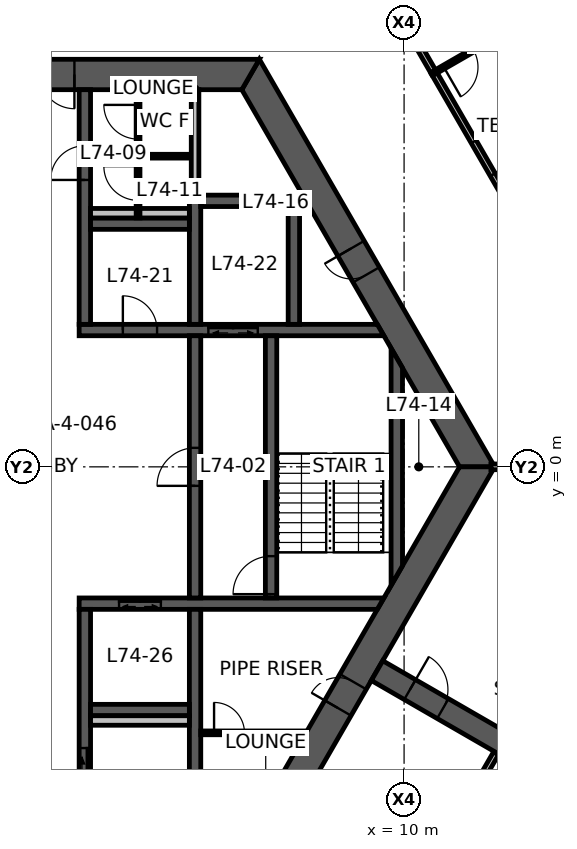
"""IFC4 building model, lengths in metres.
Left out: names, types, materials, properties, quantities, classifications, styles, units other than length and angle.
Written with IfcOpenShell. Run it as: python <this file> out.ifc"""

import sys

from ifc_helpers import new_model, si_unit, direction, frame, frame_2d, origin, place, context, subcontext, project, spatial, polyline, rectangle, outline, extrude, element, fill, save


model = new_model("IFC4")
c1 = context("Model", 3, precision=1e-05, world=origin(), true_north=direction((0.0, 1.0)))
c2 = subcontext(c1, "Body", "Model", "MODEL_VIEW")
j1 = project(units=[si_unit("LENGTHUNIT", "METRE"), si_unit("PLANEANGLEUNIT", "RADIAN")], contexts=[c1])
p1 = place(None, origin())
s1 = spatial("IfcSite", under=j1, at=p1, CompositionType="ELEMENT")
p2 = place(p1, origin())
s2 = spatial("IfcBuilding", under=s1, at=p2, CompositionType="ELEMENT")
p3 = place(p2, frame((0.0, 0.0, 294.7)))
s3 = spatial("IfcBuildingStorey", under=s2, at=p3, CompositionType="ELEMENT", Elevation=294.7)
p4 = place(p3, frame((11.922, 0.0, 0.0), z_axis=(0.0, 0.0, 1.0), x_axis=(-0.500004296715, 0.866022923061, 0.0)))
e1 = element("IfcWall", 1, at=p4, inside=s3, PredefinedType="SHEAR", context=c2, shape_type="SweptSolid", body=[
    extrude(outline(polyline([(-0.231, -0.4), (5.835, -0.4), (6.635, -0.4), (12.153, -0.4), (11.691, 0.4), (6.635, 0.4), (5.835, 0.4), (0.231, 0.4), (-0.231, -0.4)])), origin(), (0.0, 0.0, 1.0), 3.9),
])
p5 = place(p4, frame((5.835, 0.0, 0.0)))
e2 = element("IfcOpeningElement", 2, at=p5, cuts=e1, PredefinedType="OPENING", context=c2, shape_type="SweptSolid", body=[
    extrude(rectangle(XDim=0.8, YDim=2.1, at=frame_2d((0.4, 1.05))), frame((0.0, 0.41, 0.0), z_axis=(0.0, -1.0, 0.0), x_axis=(1.0, 0.0, 0.0)), (0.0, 0.0, 1.0), 0.82),
])
p6 = place(p3, frame((5.961, 10.325, 0.0), z_axis=(0.0, 0.0, 1.0), x_axis=(-1.0, 0.0, 0.0)))
e3 = element("IfcWall", 3, at=p6, inside=s3, PredefinedType="SHEAR", context=c2, shape_type="SweptSolid", body=[
    extrude(outline(polyline([(-0.231, -0.4), (4.636, -0.4), (5.536, -0.4), (6.386, -0.4), (7.286, -0.4), (12.153, -0.4), (11.691, 0.4), (7.286, 0.4), (6.386, 0.4), (5.536, 0.4), (4.636, 0.4), (0.231, 0.4), (-0.231, -0.4)])), origin(), (0.0, 0.0, 1.0), 3.9),
])
p7 = place(p6, frame((6.386, 0.0, 0.0)))
e4 = element("IfcOpeningElement", 4, at=p7, cuts=e3, PredefinedType="OPENING", context=c2, shape_type="SweptSolid", body=[
    extrude(rectangle(XDim=0.9, YDim=2.1, at=frame_2d((0.45, 1.05))), frame((0.0, 0.41, 0.0), z_axis=(0.0, -1.0, 0.0), x_axis=(1.0, 0.0, 0.0)), (0.0, 0.0, 1.0), 0.82),
])
p8 = place(p6, frame((4.636, 0.0, 0.0)))
e5 = element("IfcOpeningElement", 5, at=p8, cuts=e3, PredefinedType="OPENING", context=c2, shape_type="SweptSolid", body=[
    extrude(rectangle(XDim=0.9, YDim=2.1, at=frame_2d((0.45, 1.05))), frame((0.0, 0.41, 0.0), z_axis=(0.0, -1.0, 0.0), x_axis=(1.0, 0.0, 0.0)), (0.0, 0.0, 1.0), 0.82),
])
p9 = place(p3, frame((5.961, -10.325, 0.0), z_axis=(0.0, 0.0, 1.0), x_axis=(0.500004296715, 0.866022923061, 0.0)))
e6 = element("IfcWall", 6, at=p9, inside=s3, PredefinedType="SHEAR", context=c2, shape_type="SweptSolid", body=[
    extrude(outline(polyline([(-0.231, -0.4), (4.594, -0.4), (5.394, -0.4), (12.153, -0.4), (11.691, 0.4), (5.394, 0.4), (4.594, 0.4), (0.231, 0.4), (-0.231, -0.4)])), origin(), (0.0, 0.0, 1.0), 3.9),
])
p10 = place(p9, frame((4.594, 0.0, 0.0)))
e7 = element("IfcOpeningElement", 7, at=p10, cuts=e6, PredefinedType="OPENING", context=c2, shape_type="SweptSolid", body=[
    extrude(rectangle(XDim=0.8, YDim=2.1, at=frame_2d((0.4, 1.05))), frame((0.0, 0.41, 0.0), z_axis=(0.0, -1.0, 0.0), x_axis=(1.0, 0.0, 0.0)), (0.0, 0.0, 1.0), 0.82),
])
p11 = place(p3, frame((9.288, -5.363, 0.0), z_axis=(0.0, 0.0, 1.0), x_axis=(0.866031736626, -0.499989031036, 0.0)))
e8 = element("IfcWall", 8, at=p11, inside=s3, PredefinedType="SHEAR", context=c2, shape_type="SweptSolid", body=[
    extrude(rectangle(XDim=7.796, YDim=0.6, at=frame_2d((3.898, 0.0))), origin(), (0.0, 0.0, 1.0), 3.9),
])
p12 = place(p11, frame((1.0, 0.0, 0.0)))
e9 = element("IfcOpeningElement", 9, at=p12, cuts=e8, PredefinedType="OPENING", context=c2, shape_type="SweptSolid", body=[
    extrude(rectangle(XDim=1.0, YDim=2.1, at=frame_2d((0.5, 1.05))), frame((0.0, 0.31, 0.0), z_axis=(0.0, -1.0, 0.0), x_axis=(1.0, 0.0, 0.0)), (0.0, 0.0, 1.0), 0.62),
])
p13 = place(p3, frame((1.45, 3.6, 0.0), z_axis=(0.0, 0.0, 1.0), x_axis=(1.0, 0.0, 0.0)))
e10 = element("IfcWall", 10, at=p13, inside=s3, PredefinedType="SHEAR", context=c2, shape_type="SweptSolid", body=[
    extrude(outline(polyline([(0.0, -0.15), (1.15, -0.15), (2.05, -0.15), (3.4, -0.15), (4.7, -0.15), (8.019, -0.15), (7.845, 0.15), (4.7, 0.15), (3.4, 0.15), (2.05, 0.15), (1.15, 0.15), (0.0, 0.15), (0.0, -0.15)])), origin(), (0.0, 0.0, 1.0), 3.9),
])
p14 = place(p13, frame((1.15, 0.0, 0.0)))
e11 = element("IfcOpeningElement", 11, at=p14, cuts=e10, PredefinedType="OPENING", context=c2, shape_type="SweptSolid", body=[
    extrude(rectangle(XDim=0.9, YDim=2.1, at=frame_2d((0.45, 1.05))), frame((0.0, 0.16, 0.0), z_axis=(0.0, -1.0, 0.0), x_axis=(1.0, 0.0, 0.0)), (0.0, 0.0, 1.0), 0.32),
])
p15 = place(p13, frame((3.4, 0.0, 0.0)))
e12 = element("IfcOpeningElement", 12, at=p15, cuts=e10, PredefinedType="OPENING", context=c2, shape_type="SweptSolid", body=[
    extrude(rectangle(XDim=1.3, YDim=2.1, at=frame_2d((0.65, 1.05))), frame((0.0, 0.16, 0.0), z_axis=(0.0, -1.0, 0.0), x_axis=(1.0, 0.0, 0.0)), (0.0, 0.0, 1.0), 0.32),
])
p16 = place(p3, frame((1.45, -3.6, 0.0), z_axis=(0.0, 0.0, 1.0), x_axis=(1.0, 0.0, 0.0)))
e13 = element("IfcWall", 13, at=p16, inside=s3, PredefinedType="SHEAR", context=c2, shape_type="SweptSolid", body=[
    extrude(outline(polyline([(0.0, -0.15), (1.05, -0.15), (2.15, -0.15), (7.845, -0.15), (8.019, 0.15), (2.15, 0.15), (1.05, 0.15), (0.0, 0.15), (0.0, -0.15)])), origin(), (0.0, 0.0, 1.0), 3.9),
])
p17 = place(p16, frame((1.05, 0.0, 0.0)))
e14 = element("IfcOpeningElement", 14, at=p17, cuts=e13, PredefinedType="OPENING", context=c2, shape_type="SweptSolid", body=[
    extrude(rectangle(XDim=1.1, YDim=2.1, at=frame_2d((0.55, 1.05))), frame((0.0, 0.16, 0.0), z_axis=(0.0, -1.0, 0.0), x_axis=(1.0, 0.0, 0.0)), (0.0, 0.0, 1.0), 0.32),
])
p18 = place(p3, frame((1.6, 3.75, 0.0), z_axis=(0.0, 0.0, 1.0), x_axis=(0.0, 1.0, 0.0)))
e15 = element("IfcWall", 15, at=p18, inside=s3, PredefinedType="SHEAR", context=c2, shape_type="SweptSolid", body=[
    extrude(rectangle(XDim=6.175, YDim=0.3, at=frame_2d((3.087, 0.0))), origin(), (0.0, 0.0, 1.0), 3.9),
])
p19 = place(p18, frame((3.8, 0.0, 0.0)))
e16 = element("IfcOpeningElement", 16, at=p19, cuts=e15, PredefinedType="OPENING", context=c2, shape_type="SweptSolid", body=[
    extrude(rectangle(XDim=0.9, YDim=2.1, at=frame_2d((0.45, 1.05))), frame((0.0, 0.16, 0.0), z_axis=(0.0, -1.0, 0.0), x_axis=(1.0, 0.0, 0.0)), (0.0, 0.0, 1.0), 0.32),
])
p20 = place(p3, frame((1.6, -3.75, 0.0), z_axis=(0.0, 0.0, 1.0), x_axis=(0.0, -1.0, 0.0)))
e17 = element("IfcWall", 17, at=p20, inside=s3, PredefinedType="SHEAR", context=c2, shape_type="SweptSolid", body=[
    extrude(rectangle(XDim=6.175, YDim=0.3, at=frame_2d((3.087, 0.0))), origin(), (0.0, 0.0, 1.0), 3.9),
])
p21 = place(p20, frame((3.65, 0.0, 0.0)))
e18 = element("IfcOpeningElement", 18, at=p21, cuts=e17, PredefinedType="OPENING", context=c2, shape_type="SweptSolid", body=[
    extrude(rectangle(XDim=1.2, YDim=2.1, at=frame_2d((0.6, 1.05))), frame((0.0, 0.16, 0.0), z_axis=(0.0, -1.0, 0.0), x_axis=(1.0, 0.0, 0.0)), (0.0, 0.0, 1.0), 0.32),
])
p22 = place(p3, frame((4.5, -3.45, 0.0), z_axis=(0.0, 0.0, 1.0), x_axis=(0.0, 1.0, 0.0)))
e19 = element("IfcWall", 19, at=p22, inside=s3, PredefinedType="SHEAR", context=c2, shape_type="SweptSolid", body=[
    extrude(rectangle(XDim=6.9, YDim=0.3, at=frame_2d((3.45, 0.0))), origin(), (0.0, 0.0, 1.0), 3.9),
])
p23 = place(p22, frame((2.95, 0.0, 0.0)))
e20 = element("IfcOpeningElement", 20, at=p23, cuts=e19, PredefinedType="OPENING", context=c2, shape_type="SweptSolid", body=[
    extrude(rectangle(XDim=1.0, YDim=2.1, at=frame_2d((0.5, 1.05))), frame((0.0, 0.16, 0.0), z_axis=(0.0, -1.0, 0.0), x_axis=(1.0, 0.0, 0.0)), (0.0, 0.0, 1.0), 0.32),
])
p24 = place(p3, frame((6.5, -3.45, 0.0), z_axis=(0.0, 0.0, 1.0), x_axis=(0.0, 1.0, 0.0)))
e21 = element("IfcWall", 21, at=p24, inside=s3, PredefinedType="SHEAR", context=c2, shape_type="SweptSolid", body=[
    extrude(rectangle(XDim=6.9, YDim=0.3, at=frame_2d((3.45, 0.0))), origin(), (0.0, 0.0, 1.0), 3.9),
])
p25 = place(p24, frame((0.1, 0.0, 0.0)))
e22 = element("IfcOpeningElement", 22, at=p25, cuts=e21, PredefinedType="OPENING", context=c2, shape_type="SweptSolid", body=[
    extrude(rectangle(XDim=1.0, YDim=2.1, at=frame_2d((0.5, 1.05))), frame((0.0, 0.16, 0.0), z_axis=(0.0, -1.0, 0.0), x_axis=(1.0, 0.0, 0.0)), (0.0, 0.0, 1.0), 0.32),
])
p26 = place(p3, frame((4.5, 3.75, 0.0), z_axis=(0.0, 0.0, 1.0), x_axis=(0.0, 1.0, 0.0)))
e23 = element("IfcWall", 23, at=p26, inside=s3, PredefinedType="SHEAR", context=c2, shape_type="SweptSolid", body=[
    extrude(rectangle(XDim=3.4, YDim=0.3, at=frame_2d((1.7, 0.0))), origin(), (0.0, 0.0, 1.0), 3.9),
])
p27 = place(p3, frame((4.5, -3.75, 0.0), z_axis=(0.0, 0.0, 1.0), x_axis=(0.0, -1.0, 0.0)))
e24 = element("IfcWall", 24, at=p27, inside=s3, PredefinedType="SHEAR", context=c2, shape_type="SweptSolid", body=[
    extrude(rectangle(XDim=6.175, YDim=0.3, at=frame_2d((3.087, 0.0))), origin(), (0.0, 0.0, 1.0), 3.9),
])
for number, where, z_axis, x_axis in (
    (25, (1.75, 6.4, 0.0), (0.0, 0.0, 1.0), (1.0, 0.0, 0.0)),
    (26, (1.75, -6.4, 0.0), (0.0, 0.0, 1.0), (1.0, 0.0, 0.0)),
    (27, (4.65, 7.0, 0.0), (0.0, 0.0, 1.0), (1.0, 0.0, 0.0)),
):
    element("IfcWall", number, at=place(p3, frame(where, z_axis=z_axis, x_axis=x_axis)), inside=s3, PredefinedType="SHEAR", context=c2, shape_type="SweptSolid", body=[
        extrude(rectangle(XDim=2.6, YDim=0.3, at=frame_2d((1.3, 0.0))), origin(), (0.0, 0.0, 1.0), 3.9),
    ])
p28 = place(p3, frame((7.1, 3.75, 0.0), z_axis=(0.0, 0.0, 1.0), x_axis=(0.0, 1.0, 0.0)))
e28 = element("IfcWall", 28, at=p28, inside=s3, PredefinedType="SHEAR", context=c2, shape_type="SweptSolid", body=[
    extrude(rectangle(XDim=3.1, YDim=0.3, at=frame_2d((1.55, 0.0))), origin(), (0.0, 0.0, 1.0), 3.9),
])
p29 = place(p3, frame((9.808, -2.862, 0.0), z_axis=(0.0, 0.0, 1.0), x_axis=(0.0, 1.0, 0.0)))
e29 = element("IfcWall", 29, at=p29, inside=s3, PredefinedType="SHEAR", context=c2, shape_type="SweptSolid", body=[
    extrude(outline(polyline([(0.26, -0.15), (5.465, -0.15), (5.984, 0.15), (-0.26, 0.15), (0.26, -0.15)])), origin(), (0.0, 0.0, 1.0), 3.9),
])
p30 = place(p3, frame((4.5, 7.15, 0.0), z_axis=(0.0, 0.0, 1.0), x_axis=(0.0, 1.0, 0.0)))
e30 = element("IfcWall", 30, at=p30, inside=s3, PredefinedType="STANDARD", context=c2, shape_type="SweptSolid", body=[
    extrude(rectangle(XDim=2.775, YDim=0.2, at=frame_2d((1.388, 0.0))), origin(), (0.0, 0.0, 1.0), 3.9),
])
for number, where, z_axis, x_axis in (
    (31, (1.75, 6.675, 0.0), (0.0, 0.0, 1.0), (1.0, 0.0, 0.0)),
    (32, (1.75, -6.675, 0.0), (0.0, 0.0, 1.0), (1.0, 0.0, 0.0)),
):
    element("IfcWall", number, at=place(p3, frame(where, z_axis=z_axis, x_axis=x_axis)), inside=s3, PredefinedType="PLUMBINGWALL", context=c2, shape_type="SweptSolid", body=[
        extrude(rectangle(XDim=2.6, YDim=0.25, at=frame_2d((1.3, 0.0))), origin(), (0.0, 0.0, 1.0), 3.9),
    ])
p31 = place(p3, frame((3.0, 6.55, 0.0), z_axis=(0.0, 0.0, 1.0), x_axis=(0.0, 1.0, 0.0)))
e33 = element("IfcWall", 33, at=p31, inside=s3, PredefinedType="PARTITIONING", context=c2, shape_type="SweptSolid", body=[
    extrude(rectangle(XDim=3.375, YDim=0.1, at=frame_2d((1.688, 0.0))), origin(), (0.0, 0.0, 1.0), 2.95),
])
p32 = place(p31, frame((2.075, 0.0, 0.0)))
e34 = element("IfcOpeningElement", 34, at=p32, cuts=e33, PredefinedType="OPENING", context=c2, shape_type="SweptSolid", body=[
    extrude(rectangle(XDim=0.9, YDim=2.1, at=frame_2d((0.45, 1.05))), frame((0.0, 0.06, 0.0), z_axis=(0.0, -1.0, 0.0), x_axis=(1.0, 0.0, 0.0)), (0.0, 0.0, 1.0), 0.12),
])
p33 = place(p31, frame((0.462, 0.0, 0.0)))
e35 = element("IfcOpeningElement", 35, at=p33, cuts=e33, PredefinedType="OPENING", context=c2, shape_type="SweptSolid", body=[
    extrude(rectangle(XDim=0.9, YDim=2.1, at=frame_2d((0.45, 1.05))), frame((0.0, 0.06, 0.0), z_axis=(0.0, -1.0, 0.0), x_axis=(1.0, 0.0, 0.0)), (0.0, 0.0, 1.0), 0.12),
])
p34 = place(p3, frame((3.05, 8.175, 0.0), z_axis=(0.0, 0.0, 1.0), x_axis=(1.0, 0.0, 0.0)))
e36 = element("IfcWall", 36, at=p34, inside=s3, PredefinedType="PARTITIONING", context=c2, shape_type="SweptSolid", body=[
    extrude(rectangle(XDim=1.3, YDim=0.1, at=frame_2d((0.65, 0.0))), origin(), (0.0, 0.0, 1.0), 2.95),
])
p35 = place(p3, frame((4.65, -7.0, 0.0), z_axis=(0.0, 0.0, 1.0), x_axis=(1.0, 0.0, 0.0)))
e37 = element("IfcWall", 37, at=p35, inside=s3, PredefinedType="PARTITIONING", context=c2, shape_type="SweptSolid", body=[
    extrude(outline(polyline([(0.0, -0.05), (0.35, -0.05), (1.15, -0.05), (2.74, -0.05), (2.769, 0.0), (2.775, 0.05), (1.15, 0.05), (0.35, 0.05), (0.0, 0.05), (0.0, -0.05)])), origin(), (0.0, 0.0, 1.0), 2.95),
])
p36 = place(p35, frame((0.35, 0.0, 0.0)))
e38 = element("IfcOpeningElement", 38, at=p36, cuts=e37, PredefinedType="OPENING", context=c2, shape_type="SweptSolid", body=[
    extrude(rectangle(XDim=0.8, YDim=2.1, at=frame_2d((0.4, 1.05))), frame((0.0, 0.06, 0.0), z_axis=(0.0, -1.0, 0.0), x_axis=(1.0, 0.0, 0.0)), (0.0, 0.0, 1.0), 0.12),
])
p37 = place(p3, frame((9.119, 13.256, 0.0), z_axis=(0.0, 0.0, 1.0), x_axis=(0.499990242038, -0.866031037473, 0.0)))
e39 = element("IfcWall", 39, at=p37, inside=s3, PredefinedType="PARTITIONING", context=c2, shape_type="SweptSolid", body=[
    extrude(rectangle(XDim=3.341, YDim=0.15, at=frame_2d((1.67, 0.0))), origin(), (0.0, 0.0, 1.0), 2.95),
])
p38 = place(p3, frame((10.785, 10.37, 0.0), z_axis=(0.0, 0.0, 1.0), x_axis=(0.499992432099, -0.86602977307, 0.0)))
e40 = element("IfcWall", 40, at=p38, inside=s3, PredefinedType="PARTITIONING", context=c2, shape_type="SweptSolid", body=[
    extrude(rectangle(XDim=5.192, YDim=0.15, at=frame_2d((2.596, 0.0))), origin(), (0.0, 0.0, 1.0), 2.95),
])
p39 = place(p38, frame((2.096, 0.0, 0.0)))
e41 = element("IfcOpeningElement", 41, at=p39, cuts=e40, PredefinedType="OPENING", context=c2, shape_type="SweptSolid", body=[
    extrude(rectangle(XDim=1.0, YDim=2.1, at=frame_2d((0.5, 1.05))), frame((0.0, 0.085, 0.0), z_axis=(0.0, -1.0, 0.0), x_axis=(1.0, 0.0, 0.0)), (0.0, 0.0, 1.0), 0.17),
])
p40 = place(p3, frame((13.654, 12.022, 0.0), z_axis=(0.0, 0.0, 1.0), x_axis=(-0.866613759554, -0.498979550434, 0.0)))
e42 = element("IfcWall", 42, at=p40, inside=s3, PredefinedType="PARTITIONING", context=c2, shape_type="SweptSolid", body=[
    extrude(rectangle(XDim=3.311, YDim=0.1, at=frame_2d((1.655, 0.0))), origin(), (0.0, 0.0, 1.0), 2.95),
])
p41 = place(p40, frame((2.11, 0.0, 0.0)))
e43 = element("IfcOpeningElement", 43, at=p41, cuts=e42, PredefinedType="OPENING", context=c2, shape_type="SweptSolid", body=[
    extrude(rectangle(XDim=0.9, YDim=2.1, at=frame_2d((0.45, 1.05))), frame((0.0, 0.06, 0.0), z_axis=(0.0, -1.0, 0.0), x_axis=(1.0, 0.0, 0.0)), (0.0, 0.0, 1.0), 0.12),
])
p42 = place(p3, frame((12.419, -7.54, 0.0), z_axis=(0.0, 0.0, 1.0), x_axis=(-0.499996687877, -0.866027316031, 0.0)))
e44 = element("IfcWall", 44, at=p42, inside=s3, PredefinedType="PARTITIONING", context=c2, shape_type="SweptSolid", body=[
    extrude(rectangle(XDim=8.066, YDim=0.15, at=frame_2d((4.033, 0.0))), origin(), (0.0, 0.0, 1.0), 2.95),
])
p43 = place(p42, frame((3.533, 0.0, 0.0)))
e45 = element("IfcOpeningElement", 45, at=p43, cuts=e44, PredefinedType="OPENING", context=c2, shape_type="SweptSolid", body=[
    extrude(rectangle(XDim=1.0, YDim=2.1, at=frame_2d((0.5, 1.05))), frame((0.0, 0.085, 0.0), z_axis=(0.0, -1.0, 0.0), x_axis=(1.0, 0.0, 0.0)), (0.0, 0.0, 1.0), 0.17),
])
p44 = place(p3, frame((12.284, 0.0, 0.0), z_axis=(0.0, 0.0, 1.0), x_axis=(1.0, 0.0, 0.0)))
e46 = element("IfcWall", 46, at=p44, inside=s3, PredefinedType="PARTITIONING", context=c2, shape_type="SweptSolid", body=[
    extrude(rectangle(XDim=4.363, YDim=0.15, at=frame_2d((2.181, 0.0))), origin(), (0.0, 0.0, 1.0), 2.95),
])
p45 = place(p8, origin())
e47 = element("IfcDoor", 47, at=p45, inside=s3, OperationType="SINGLE_SWING_LEFT", PredefinedType="DOOR", context=c2, shape_type="SweptSolid", body=[
    extrude(rectangle(XDim=0.9, YDim=2.1, at=frame_2d((0.45, 1.05))), frame((0.0, 0.025, 0.0), z_axis=(0.0, -1.0, 0.0), x_axis=(1.0, 0.0, 0.0)), (0.0, 0.0, 1.0), 0.05),
])
fill(e5, e47)
p46 = place(p5, origin())
e48 = element("IfcDoor", 48, at=p46, inside=s3, OperationType="SINGLE_SWING_RIGHT", PredefinedType="DOOR", context=c2, shape_type="SweptSolid", body=[
    extrude(rectangle(XDim=0.8, YDim=2.1, at=frame_2d((0.4, 1.05))), frame((0.0, 0.025, 0.0), z_axis=(0.0, -1.0, 0.0), x_axis=(1.0, 0.0, 0.0)), (0.0, 0.0, 1.0), 0.05),
])
fill(e2, e48)
p47 = place(p10, origin())
e49 = element("IfcDoor", 49, at=p47, inside=s3, OperationType="SINGLE_SWING_LEFT", PredefinedType="DOOR", context=c2, shape_type="SweptSolid", body=[
    extrude(rectangle(XDim=0.8, YDim=2.1, at=frame_2d((0.4, 1.05))), frame((0.0, 0.025, 0.0), z_axis=(0.0, -1.0, 0.0), x_axis=(1.0, 0.0, 0.0)), (0.0, 0.0, 1.0), 0.05),
])
fill(e7, e49)
p48 = place(p23, origin())
e50 = element("IfcDoor", 50, at=p48, inside=s3, OperationType="SINGLE_SWING_LEFT", PredefinedType="DOOR", context=c2, shape_type="SweptSolid", body=[
    extrude(rectangle(XDim=1.0, YDim=2.1, at=frame_2d((0.5, 1.05))), frame((0.0, 0.025, 0.0), z_axis=(0.0, -1.0, 0.0), x_axis=(1.0, 0.0, 0.0)), (0.0, 0.0, 1.0), 0.05),
])
fill(e20, e50)
p49 = place(p25, origin())
e51 = element("IfcDoor", 51, at=p49, inside=s3, OperationType="SINGLE_SWING_LEFT", PredefinedType="DOOR", context=c2, shape_type="SweptSolid", body=[
    extrude(rectangle(XDim=1.0, YDim=2.1, at=frame_2d((0.5, 1.05))), frame((0.0, 0.025, 0.0), z_axis=(0.0, -1.0, 0.0), x_axis=(1.0, 0.0, 0.0)), (0.0, 0.0, 1.0), 0.05),
])
fill(e22, e51)
p50 = place(p19, origin())
e52 = element("IfcDoor", 52, at=p50, inside=s3, OperationType="SINGLE_SWING_LEFT", PredefinedType="DOOR", context=c2, shape_type="SweptSolid", body=[
    extrude(rectangle(XDim=0.9, YDim=2.1, at=frame_2d((0.45, 1.05))), frame((0.0, 0.025, 0.0), z_axis=(0.0, -1.0, 0.0), x_axis=(1.0, 0.0, 0.0)), (0.0, 0.0, 1.0), 0.05),
])
fill(e16, e52)
p51 = place(p21, origin())
e53 = element("IfcDoor", 53, at=p51, inside=s3, OperationType="SLIDING_TO_LEFT", PredefinedType="DOOR", context=c2, shape_type="SweptSolid", body=[
    extrude(rectangle(XDim=1.2, YDim=2.1, at=frame_2d((0.6, 1.05))), frame((0.0, 0.025, 0.0), z_axis=(0.0, -1.0, 0.0), x_axis=(1.0, 0.0, 0.0)), (0.0, 0.0, 1.0), 0.05),
])
fill(e18, e53)
p52 = place(p14, origin())
e54 = element("IfcDoor", 54, at=p52, inside=s3, OperationType="SINGLE_SWING_LEFT", PredefinedType="DOOR", context=c2, shape_type="SweptSolid", body=[
    extrude(rectangle(XDim=0.9, YDim=2.1, at=frame_2d((0.45, 1.05))), frame((0.0, 0.025, 0.0), z_axis=(0.0, -1.0, 0.0), x_axis=(1.0, 0.0, 0.0)), (0.0, 0.0, 1.0), 0.05),
])
fill(e11, e54)
p53 = place(p12, origin())
e55 = element("IfcDoor", 55, at=p53, inside=s3, OperationType="SINGLE_SWING_LEFT", PredefinedType="DOOR", context=c2, shape_type="SweptSolid", body=[
    extrude(rectangle(XDim=1.0, YDim=2.1, at=frame_2d((0.5, 1.05))), frame((0.0, 0.025, 0.0), z_axis=(0.0, -1.0, 0.0), x_axis=(1.0, 0.0, 0.0)), (0.0, 0.0, 1.0), 0.05),
])
fill(e9, e55)
p54 = place(p32, origin())
e56 = element("IfcDoor", 56, at=p54, inside=s3, OperationType="SINGLE_SWING_RIGHT", PredefinedType="DOOR", context=c2, shape_type="SweptSolid", body=[
    extrude(rectangle(XDim=0.9, YDim=2.1, at=frame_2d((0.45, 1.05))), frame((0.0, 0.025, 0.0), z_axis=(0.0, -1.0, 0.0), x_axis=(1.0, 0.0, 0.0)), (0.0, 0.0, 1.0), 0.05),
])
fill(e34, e56)
p55 = place(p33, origin())
e57 = element("IfcDoor", 57, at=p55, inside=s3, OperationType="SINGLE_SWING_RIGHT", PredefinedType="DOOR", context=c2, shape_type="SweptSolid", body=[
    extrude(rectangle(XDim=0.9, YDim=2.1, at=frame_2d((0.45, 1.05))), frame((0.0, 0.025, 0.0), z_axis=(0.0, -1.0, 0.0), x_axis=(1.0, 0.0, 0.0)), (0.0, 0.0, 1.0), 0.05),
])
fill(e35, e57)
p56 = place(p36, origin())
e58 = element("IfcDoor", 58, at=p56, inside=s3, OperationType="SINGLE_SWING_LEFT", PredefinedType="DOOR", context=c2, shape_type="SweptSolid", body=[
    extrude(rectangle(XDim=0.8, YDim=2.1, at=frame_2d((0.4, 1.05))), frame((0.0, 0.025, 0.0), z_axis=(0.0, -1.0, 0.0), x_axis=(1.0, 0.0, 0.0)), (0.0, 0.0, 1.0), 0.05),
])
fill(e38, e58)
p57 = place(p39, origin())
e59 = element("IfcDoor", 59, at=p57, inside=s3, OperationType="SINGLE_SWING_RIGHT", PredefinedType="DOOR", context=c2, shape_type="SweptSolid", body=[
    extrude(rectangle(XDim=1.0, YDim=2.1, at=frame_2d((0.5, 1.05))), frame((0.0, 0.025, 0.0), z_axis=(0.0, -1.0, 0.0), x_axis=(1.0, 0.0, 0.0)), (0.0, 0.0, 1.0), 0.05),
])
fill(e41, e59)
p58 = place(p41, origin())
e60 = element("IfcDoor", 60, at=p58, inside=s3, OperationType="SINGLE_SWING_RIGHT", PredefinedType="DOOR", context=c2, shape_type="SweptSolid", body=[
    extrude(rectangle(XDim=0.9, YDim=2.1, at=frame_2d((0.45, 1.05))), frame((0.0, 0.025, 0.0), z_axis=(0.0, -1.0, 0.0), x_axis=(1.0, 0.0, 0.0)), (0.0, 0.0, 1.0), 0.05),
])
fill(e43, e60)
p59 = place(p17, origin())
e61 = element("IfcDoor", 61, at=p59, inside=s3, OperationType="DOUBLE_DOOR_SLIDING", PredefinedType="DOOR", context=c2, shape_type="SweptSolid", body=[
    extrude(rectangle(XDim=1.1, YDim=2.1, at=frame_2d((0.55, 1.05))), frame((0.0, 0.025, 0.0), z_axis=(0.0, -1.0, 0.0), x_axis=(1.0, 0.0, 0.0)), (0.0, 0.0, 1.0), 0.05),
])
fill(e14, e61)
p60 = place(p15, origin())
e62 = element("IfcDoor", 62, at=p60, inside=s3, OperationType="DOUBLE_DOOR_SLIDING", PredefinedType="DOOR", context=c2, shape_type="SweptSolid", body=[
    extrude(rectangle(XDim=1.3, YDim=2.1, at=frame_2d((0.65, 1.05))), frame((0.0, 0.025, 0.0), z_axis=(0.0, -1.0, 0.0), x_axis=(1.0, 0.0, 0.0)), (0.0, 0.0, 1.0), 0.05),
])
fill(e12, e62)
save(model, sys.argv[1])
